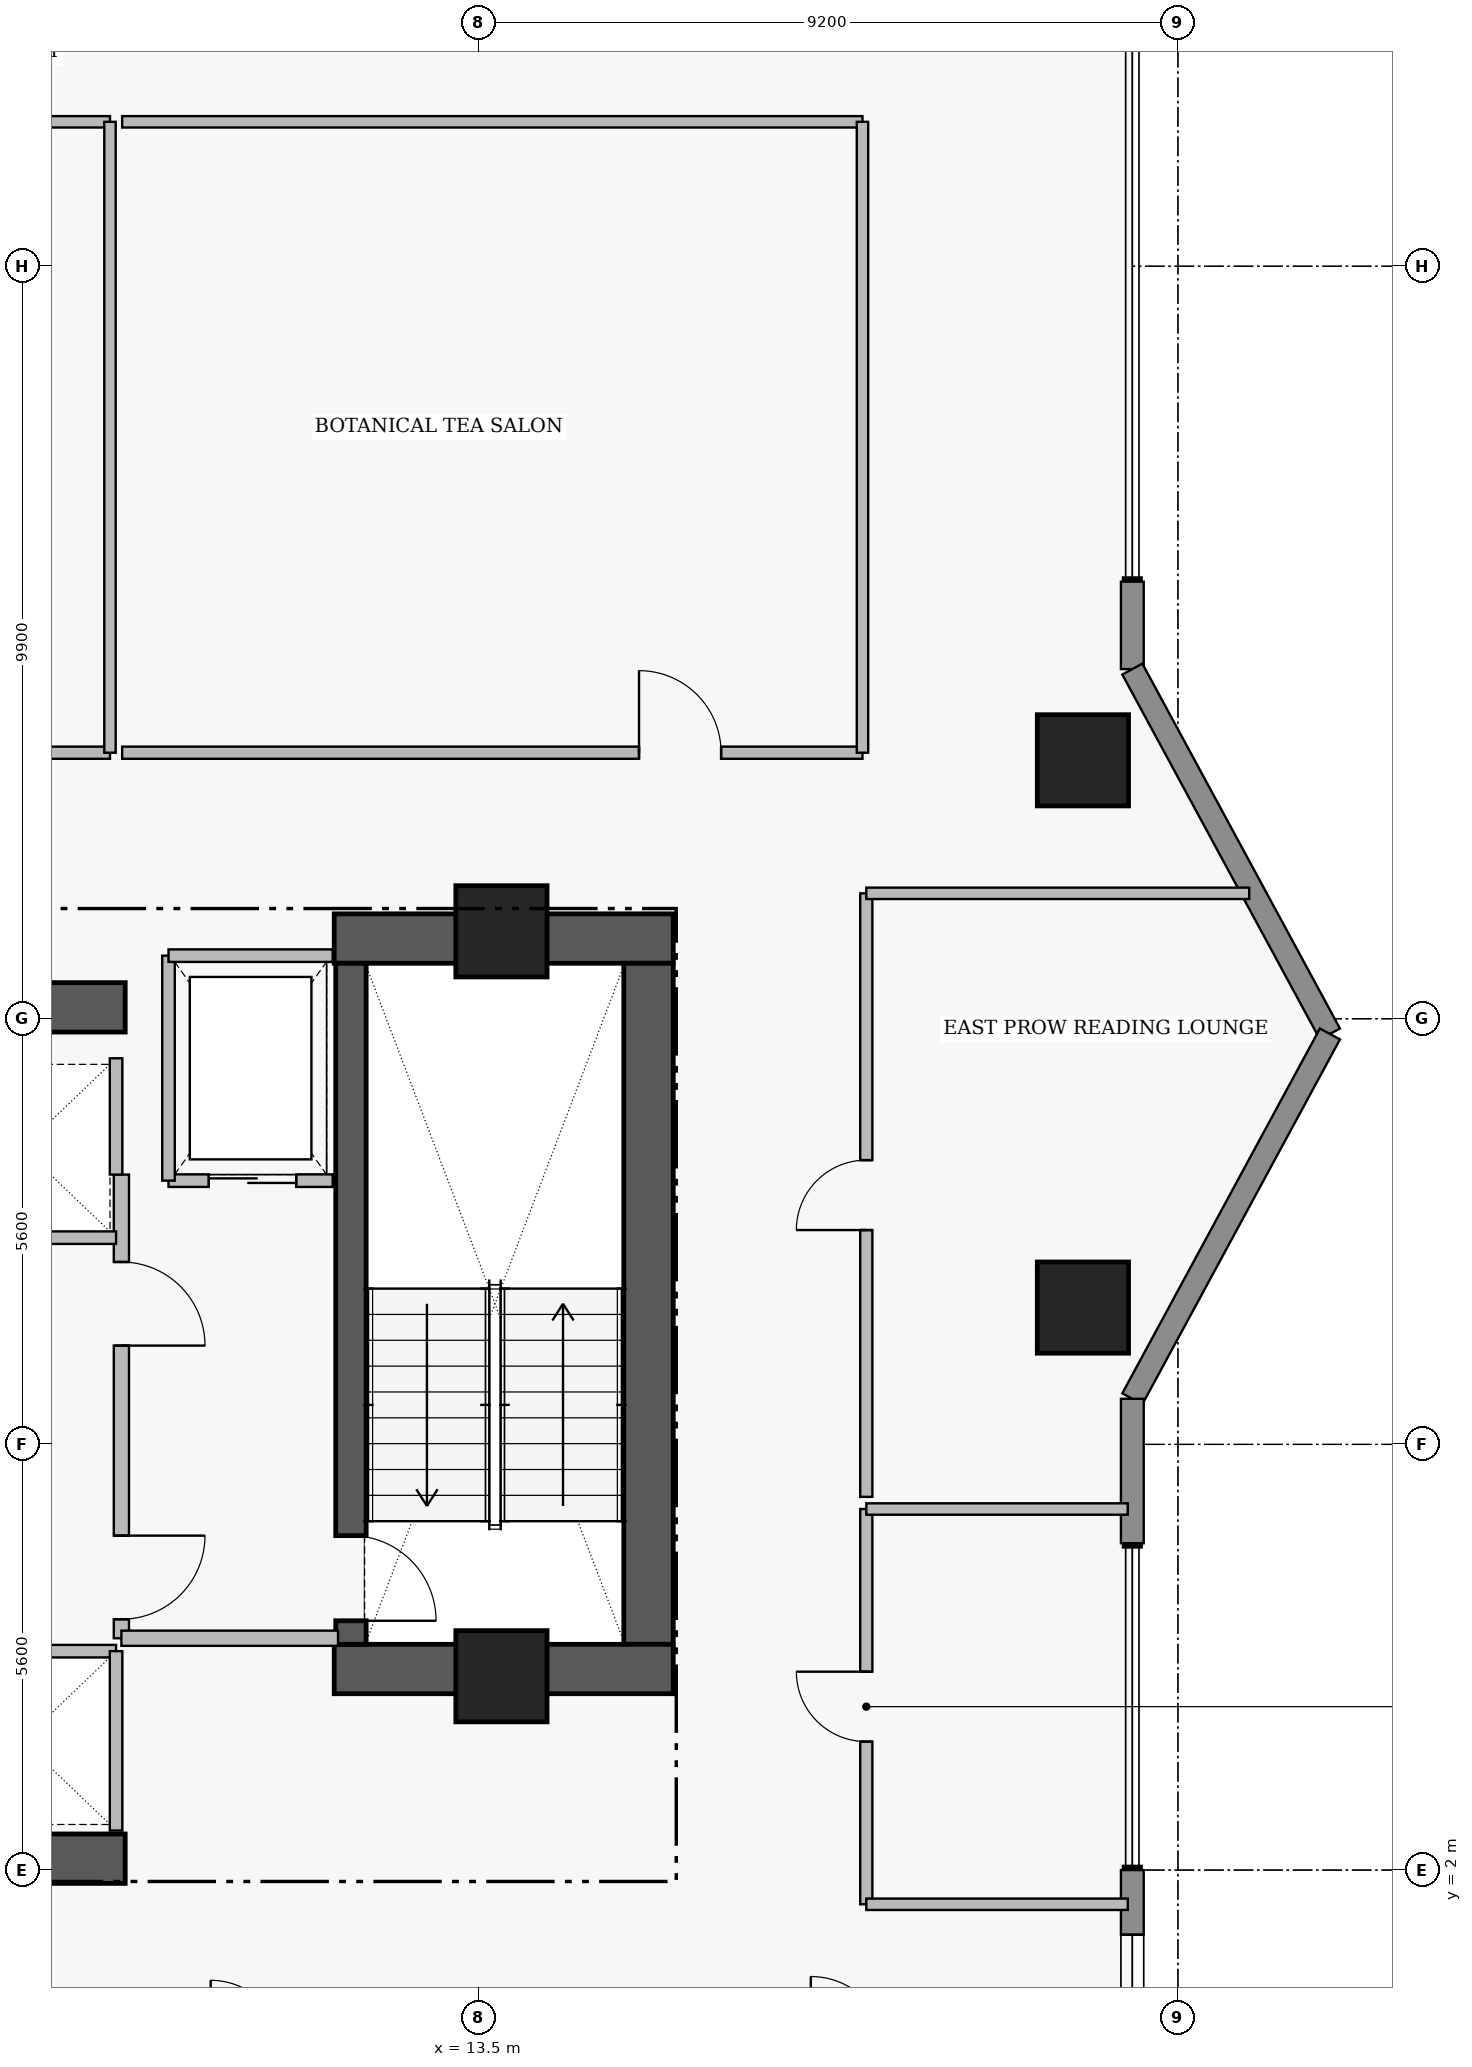
"""IFC4 building model, lengths in metres.
Left out: names, types, materials, properties, quantities, classifications, styles, units other than length and angle.
Written with IfcOpenShell. Run it as: python <this file> out.ifc"""

import sys

from ifc_helpers import new_model, si_unit, direction, frame, frame_2d, origin, origin_2d, place, context, subcontext, project, spatial, rectangle, extrude, element, fill, save


model = new_model("IFC4")
c1 = context("Model", 3, precision=1e-05, world=origin(), true_north=direction((0.0, 1.0)))
c2 = subcontext(c1, "Body", "Model", "MODEL_VIEW")
j1 = project(units=[si_unit("LENGTHUNIT", "METRE"), si_unit("PLANEANGLEUNIT", "RADIAN")], contexts=[c1])
p1 = place(None, origin())
s1 = spatial("IfcSite", under=j1, at=p1, CompositionType="ELEMENT")
p2 = place(p1, origin())
s2 = spatial("IfcBuilding", under=s1, at=p2, CompositionType="ELEMENT")
p3 = place(p2, frame((0.0, 0.0, 188.65)))
s3 = spatial("IfcBuildingStorey", under=s2, at=p3, CompositionType="ELEMENT", Elevation=188.65)
p4 = place(p3, frame((11.6, 14.255, 0.0), z_axis=(0.0, 0.0, 1.0), x_axis=(1.0, 0.0, 0.0)))
e1 = element("IfcWall", 1, at=p4, inside=s3, PredefinedType="SHEAR", context=c2, shape_type="SweptSolid", body=[
    extrude(rectangle(XDim=4.46, YDim=0.65, at=frame_2d((2.23, 0.0))), origin(), (0.0, 0.0, 1.0), 3.56),
])
p5 = place(p3, frame((15.735, 4.97, 0.0), z_axis=(0.0, 0.0, 1.0), x_axis=(0.0, 1.0, 0.0)))
e2 = element("IfcWall", 2, at=p5, inside=s3, PredefinedType="SHEAR", context=c2, shape_type="SweptSolid", body=[
    extrude(rectangle(XDim=8.96, YDim=0.65, at=frame_2d((4.48, 0.0))), origin(), (0.0, 0.0, 1.0), 3.56),
])
p6 = place(p3, frame((11.6, 4.645, 0.0), z_axis=(0.0, 0.0, 1.0), x_axis=(1.0, 0.0, 0.0)))
e3 = element("IfcWall", 3, at=p6, inside=s3, PredefinedType="SHEAR", context=c2, shape_type="SweptSolid", body=[
    extrude(rectangle(XDim=4.46, YDim=0.65, at=frame_2d((2.23, 0.0))), origin(), (0.0, 0.0, 1.0), 3.56),
])
for number, where, z_axis, x_axis in (
    (4, (1.25, 2.15, 0.0), (0.0, 0.0, 1.0), (1.0, 0.0, 0.0)),
    (5, (1.25, 13.35, 0.0), (0.0, 0.0, 1.0), (1.0, 0.0, 0.0)),
):
    element("IfcWall", number, at=place(p3, frame(where, z_axis=z_axis, x_axis=x_axis)), inside=s3, PredefinedType="SHEAR", context=c2, shape_type="SweptSolid", body=[
        extrude(rectangle(XDim=7.6, YDim=0.65, at=frame_2d((3.8, 0.0))), origin(), (0.0, 0.0, 1.0), 3.53),
    ])
p7 = place(p3, frame((11.82, 13.93, 0.0), z_axis=(0.0, 0.0, 1.0), x_axis=(0.0, -1.0, 0.0)))
e6 = element("IfcWall", 6, at=p7, inside=s3, PredefinedType="SHEAR", context=c2, shape_type="SweptSolid", body=[
    extrude(rectangle(XDim=8.96, YDim=0.4, at=frame_2d((4.48, 0.0))), origin(), (0.0, 0.0, 1.0), 3.56),
])
p8 = place(p7, frame((7.53, 0.0, 0.0)))
e7 = element("IfcOpeningElement", 7, at=p8, cuts=e6, PredefinedType="OPENING", context=c2, shape_type="SweptSolid", body=[
    extrude(rectangle(XDim=1.12, YDim=2.22, at=frame_2d((0.56, 1.11))), frame((0.0, 0.21, 0.0), z_axis=(0.0, -1.0, 0.0), x_axis=(1.0, 0.0, 0.0)), (0.0, 0.0, 1.0), 0.42),
])
for number, where, z_axis, x_axis in (
    (8, (13.8, 14.35, 0.0), (0.0, 0.0, 1.0), (1.0, 0.0, 0.0)),
    (9, (13.8, 4.55, 0.0), (0.0, 0.0, 1.0), (1.0, 0.0, 0.0)),
    (10, (21.45, 9.4, 0.0), (0.0, 0.0, 1.0), (1.0, 0.0, 0.0)),
    (11, (21.45, 16.6, 0.0), (0.0, 0.0, 1.0), (1.0, 0.0, 0.0)),
):
    element("IfcColumn", number, at=place(p3, frame(where, z_axis=z_axis, x_axis=x_axis)), inside=s3, PredefinedType="COLUMN", context=c2, shape_type="SweptSolid", body=[
        extrude(rectangle(XDim=1.2, YDim=1.2, at=origin_2d()), origin(), (0.0, 0.0, 1.0), 3.75),
    ])
p9 = place(p3, frame((22.1, 18.95, 0.0), z_axis=(0.0, 0.0, 1.0), x_axis=(0.0, -1.0, 0.0)))
e12 = element("IfcWall", 12, at=p9, inside=s3, PredefinedType="STANDARD", context=c2, shape_type="SweptSolid", body=[
    extrude(rectangle(XDim=1.15, YDim=0.3, at=frame_2d((0.575, 0.0))), origin(), (0.0, 0.0, 1.0), 3.53),
])
for number, where, z_axis, x_axis in (
    (13, (22.1, 17.8, 0.0), (0.0, 0.0, 1.0), (0.476, -0.879, 0.0)),
    (14, (24.7, 13.0, 0.0), (0.0, 0.0, 1.0), (-0.476, -0.879, 0.0)),
):
    element("IfcWall", number, at=place(p3, frame(where, z_axis=z_axis, x_axis=x_axis)), inside=s3, PredefinedType="STANDARD", context=c2, shape_type="SweptSolid", body=[
        extrude(rectangle(XDim=5.459, YDim=0.3, at=frame_2d((2.729, 0.0))), origin(), (0.0, 0.0, 1.0), 3.53),
    ])
p10 = place(p3, frame((22.1, 8.2, 0.0), z_axis=(0.0, 0.0, 1.0), x_axis=(0.0, -1.0, 0.0)))
e15 = element("IfcWall", 15, at=p10, inside=s3, PredefinedType="STANDARD", context=c2, shape_type="SweptSolid", body=[
    extrude(rectangle(XDim=1.9, YDim=0.3, at=frame_2d((0.95, 0.0))), origin(), (0.0, 0.0, 1.0), 3.53),
])
p11 = place(p3, frame((22.1, 2.0, 0.0), z_axis=(0.0, 0.0, 1.0), x_axis=(0.0, -1.0, 0.0)))
e16 = element("IfcWall", 16, at=p11, inside=s3, PredefinedType="STANDARD", context=c2, shape_type="SweptSolid", body=[
    extrude(rectangle(XDim=2.85, YDim=0.3, at=frame_2d((1.425, 0.0))), origin(), (0.0, 0.0, 1.0), 3.53),
])
p12 = place(p11, frame((0.85, 0.0, 0.95)))
e17 = element("IfcOpeningElement", 17, at=p12, cuts=e16, PredefinedType="OPENING", context=c2, shape_type="SweptSolid", body=[
    extrude(rectangle(XDim=1.15, YDim=1.55, at=frame_2d((0.575, 0.775))), frame((0.0, 0.16, 0.0), z_axis=(0.0, -1.0, 0.0), x_axis=(1.0, 0.0, 0.0)), (0.0, 0.0, 1.0), 0.32),
])
p13 = place(p3, frame((8.8, 11.15, 0.0), z_axis=(0.0, 0.0, 1.0), x_axis=(0.0, -1.0, 0.0)))
e18 = element("IfcWall", 18, at=p13, inside=s3, PredefinedType="PARTITIONING", context=c2, shape_type="SweptSolid", body=[
    extrude(rectangle(XDim=6.1, YDim=0.2, at=frame_2d((3.05, 0.0))), origin(), (0.0, 0.0, 1.0), 3.53),
])
p14 = place(p13, frame((1.15, 0.0, 0.0)))
e19 = element("IfcOpeningElement", 19, at=p14, cuts=e18, PredefinedType="OPENING", context=c2, shape_type="SweptSolid", body=[
    extrude(rectangle(XDim=1.1, YDim=2.2, at=frame_2d((0.55, 1.1))), frame((0.0, 0.11, 0.0), z_axis=(0.0, -1.0, 0.0), x_axis=(1.0, 0.0, 0.0)), (0.0, 0.0, 1.0), 0.22),
])
p15 = place(p13, frame((4.75, 0.0, 0.0)))
e20 = element("IfcOpeningElement", 20, at=p15, cuts=e18, PredefinedType="OPENING", context=c2, shape_type="SweptSolid", body=[
    extrude(rectangle(XDim=1.1, YDim=2.2, at=frame_2d((0.55, 1.1))), frame((0.0, 0.11, 0.0), z_axis=(0.0, -1.0, 0.0), x_axis=(1.0, 0.0, 0.0)), (0.0, 0.0, 1.0), 0.22),
])
p16 = place(p3, frame((9.42, 11.07, 0.0), z_axis=(0.0, 0.0, 1.0), x_axis=(1.0, 0.0, 0.0)))
e21 = element("IfcWall", 21, at=p16, inside=s3, PredefinedType="PARTITIONING", context=c2, shape_type="SweptSolid", body=[
    extrude(rectangle(XDim=2.16, YDim=0.165, at=frame_2d((1.08, 0.0))), origin(), (0.0, 0.0, 1.0), 3.53),
])
p17 = place(p16, frame((0.53, 0.0, 0.0)))
e22 = element("IfcOpeningElement", 22, at=p17, cuts=e21, PredefinedType="OPENING", context=c2, shape_type="SweptSolid", body=[
    extrude(rectangle(XDim=1.15, YDim=2.25, at=frame_2d((0.575, 1.125))), frame((0.0, 0.093, 0.0), z_axis=(0.0, -1.0, 0.0), x_axis=(1.0, 0.0, 0.0)), (0.0, 0.0, 1.0), 0.185),
])
p18 = place(p3, frame((0.98, 16.7, 0.0), z_axis=(0.0, 0.0, 1.0), x_axis=(1.0, 0.0, 0.0)))
e23 = element("IfcWall", 23, at=p18, inside=s3, PredefinedType="PARTITIONING", context=c2, shape_type="SweptSolid", body=[
    extrude(rectangle(XDim=7.67, YDim=0.16, at=frame_2d((3.835, 0.0))), origin(), (0.0, 0.0, 1.0), 3.124),
])
p19 = place(p18, frame((5.43, 0.0, 0.0)))
e24 = element("IfcOpeningElement", 24, at=p19, cuts=e23, PredefinedType="OPENING", context=c2, shape_type="SweptSolid", body=[
    extrude(rectangle(XDim=1.08, YDim=2.18, at=frame_2d((0.54, 1.09))), frame((0.0, 0.09, 0.0), z_axis=(0.0, -1.0, 0.0), x_axis=(1.0, 0.0, 0.0)), (0.0, 0.0, 1.0), 0.18),
])
p20 = place(p3, frame((8.81, 16.7, 0.0), z_axis=(0.0, 0.0, 1.0), x_axis=(1.0, 0.0, 0.0)))
e25 = element("IfcWall", 25, at=p20, inside=s3, PredefinedType="PARTITIONING", context=c2, shape_type="SweptSolid", body=[
    extrude(rectangle(XDim=9.74, YDim=0.16, at=frame_2d((4.87, 0.0))), origin(), (0.0, 0.0, 1.0), 3.124),
])
p21 = place(p20, frame((6.8, 0.0, 0.0)))
e26 = element("IfcOpeningElement", 26, at=p21, cuts=e25, PredefinedType="OPENING", context=c2, shape_type="SweptSolid", body=[
    extrude(rectangle(XDim=1.08, YDim=2.18, at=frame_2d((0.54, 1.09))), frame((0.0, 0.09, 0.0), z_axis=(0.0, -1.0, 0.0), x_axis=(1.0, 0.0, 0.0)), (0.0, 0.0, 1.0), 0.18),
])
p22 = place(p3, frame((18.6, 1.55, 0.0), z_axis=(0.0, 0.0, 1.0), x_axis=(0.0, 1.0, 0.0)))
e27 = element("IfcWall", 27, at=p22, inside=s3, PredefinedType="PARTITIONING", context=c2, shape_type="SweptSolid", body=[
    extrude(rectangle(XDim=5.2, YDim=0.16, at=frame_2d((2.6, 0.0))), origin(), (0.0, 0.0, 1.0), 3.53),
])
p23 = place(p22, frame((2.14, 0.0, 0.0)))
e28 = element("IfcOpeningElement", 28, at=p23, cuts=e27, PredefinedType="OPENING", context=c2, shape_type="SweptSolid", body=[
    extrude(rectangle(XDim=0.92, YDim=2.12, at=frame_2d((0.46, 1.06))), frame((0.0, 0.09, 0.0), z_axis=(0.0, -1.0, 0.0), x_axis=(1.0, 0.0, 0.0)), (0.0, 0.0, 1.0), 0.18),
])
p24 = place(p3, frame((18.6, 6.91, 0.0), z_axis=(0.0, 0.0, 1.0), x_axis=(0.0, 1.0, 0.0)))
e29 = element("IfcWall", 29, at=p24, inside=s3, PredefinedType="PARTITIONING", context=c2, shape_type="SweptSolid", body=[
    extrude(rectangle(XDim=7.94, YDim=0.16, at=frame_2d((3.97, 0.0))), origin(), (0.0, 0.0, 1.0), 3.53),
])
p25 = place(p24, frame((3.51, 0.0, 0.0)))
e30 = element("IfcOpeningElement", 30, at=p25, cuts=e29, PredefinedType="OPENING", context=c2, shape_type="SweptSolid", body=[
    extrude(rectangle(XDim=0.92, YDim=2.12, at=frame_2d((0.46, 1.06))), frame((0.0, 0.09, 0.0), z_axis=(0.0, -1.0, 0.0), x_axis=(1.0, 0.0, 0.0)), (0.0, 0.0, 1.0), 0.18),
])
p26 = place(p3, frame((8.8, 5.05, 0.0), z_axis=(0.0, 0.0, 1.0), x_axis=(1.0, 0.0, 0.0)))
e31 = element("IfcWall", 31, at=p26, inside=s3, PredefinedType="PARTITIONING", context=c2, shape_type="SweptSolid", body=[
    extrude(rectangle(XDim=2.85, YDim=0.2, at=frame_2d((1.425, 0.0))), origin(), (0.0, 0.0, 1.0), 3.53),
])
p27 = place(p3, frame((9.42, 11.07, 0.0), z_axis=(0.0, 0.0, 1.0), x_axis=(0.0, 1.0, 0.0)))
e32 = element("IfcWall", 32, at=p27, inside=s3, PredefinedType="PARTITIONING", context=c2, shape_type="SweptSolid", body=[
    extrude(rectangle(XDim=2.96, YDim=0.165, at=frame_2d((1.48, 0.0))), origin(), (0.0, 0.0, 1.0), 3.53),
])
p28 = place(p3, frame((9.42, 14.03, 0.0), z_axis=(0.0, 0.0, 1.0), x_axis=(1.0, 0.0, 0.0)))
e33 = element("IfcWall", 33, at=p28, inside=s3, PredefinedType="PARTITIONING", context=c2, shape_type="SweptSolid", body=[
    extrude(rectangle(XDim=2.16, YDim=0.165, at=frame_2d((1.08, 0.0))), origin(), (0.0, 0.0, 1.0), 3.53),
])
p29 = place(p3, frame((6.25, 4.88, 0.0), z_axis=(0.0, 0.0, 1.0), x_axis=(1.0, 0.0, 0.0)))
e34 = element("IfcWall", 34, at=p29, inside=s3, PredefinedType="PARTITIONING", context=c2, shape_type="SweptSolid", body=[
    extrude(rectangle(XDim=2.48, YDim=0.165, at=frame_2d((1.24, 0.0))), origin(), (0.0, 0.0, 1.0), 3.53),
])
p30 = place(p3, frame((8.73, 2.52, 0.0), z_axis=(0.0, 0.0, 1.0), x_axis=(0.0, 1.0, 0.0)))
e35 = element("IfcWall", 35, at=p30, inside=s3, PredefinedType="PARTITIONING", context=c2, shape_type="SweptSolid", body=[
    extrude(rectangle(XDim=2.36, YDim=0.165, at=frame_2d((1.18, 0.0))), origin(), (0.0, 0.0, 1.0), 3.53),
])
p31 = place(p3, frame((6.25, 10.32, 0.0), z_axis=(0.0, 0.0, 1.0), x_axis=(1.0, 0.0, 0.0)))
e36 = element("IfcWall", 36, at=p31, inside=s3, PredefinedType="PARTITIONING", context=c2, shape_type="SweptSolid", body=[
    extrude(rectangle(XDim=2.48, YDim=0.165, at=frame_2d((1.24, 0.0))), origin(), (0.0, 0.0, 1.0), 3.53),
])
p32 = place(p3, frame((8.73, 11.15, 0.0), z_axis=(0.0, 0.0, 1.0), x_axis=(0.0, 1.0, 0.0)))
e37 = element("IfcWall", 37, at=p32, inside=s3, PredefinedType="PARTITIONING", context=c2, shape_type="SweptSolid", body=[
    extrude(rectangle(XDim=1.53, YDim=0.165, at=frame_2d((0.765, 0.0))), origin(), (0.0, 0.0, 1.0), 3.53),
])
p33 = place(p3, frame((0.98, 25.0, 0.0), z_axis=(0.0, 0.0, 1.0), x_axis=(1.0, 0.0, 0.0)))
e38 = element("IfcWall", 38, at=p33, inside=s3, PredefinedType="PARTITIONING", context=c2, shape_type="SweptSolid", body=[
    extrude(rectangle(XDim=7.67, YDim=0.15, at=frame_2d((3.835, 0.0))), origin(), (0.0, 0.0, 1.0), 3.124),
])
p34 = place(p3, frame((8.65, 16.7, 0.0), z_axis=(0.0, 0.0, 1.0), x_axis=(0.0, 1.0, 0.0)))
e39 = element("IfcWall", 39, at=p34, inside=s3, PredefinedType="PARTITIONING", context=c2, shape_type="SweptSolid", body=[
    extrude(rectangle(XDim=8.3, YDim=0.15, at=frame_2d((4.15, 0.0))), origin(), (0.0, 0.0, 1.0), 3.53),
])
p35 = place(p3, frame((8.81, 25.0, 0.0), z_axis=(0.0, 0.0, 1.0), x_axis=(1.0, 0.0, 0.0)))
e40 = element("IfcWall", 40, at=p35, inside=s3, PredefinedType="PARTITIONING", context=c2, shape_type="SweptSolid", body=[
    extrude(rectangle(XDim=9.74, YDim=0.15, at=frame_2d((4.87, 0.0))), origin(), (0.0, 0.0, 1.0), 3.124),
])
p36 = place(p3, frame((18.55, 16.7, 0.0), z_axis=(0.0, 0.0, 1.0), x_axis=(0.0, 1.0, 0.0)))
e41 = element("IfcWall", 41, at=p36, inside=s3, PredefinedType="PARTITIONING", context=c2, shape_type="SweptSolid", body=[
    extrude(rectangle(XDim=8.3, YDim=0.15, at=frame_2d((4.15, 0.0))), origin(), (0.0, 0.0, 1.0), 3.53),
])
for number, where, z_axis, x_axis in (
    (42, (18.6, 1.55, 0.0), (0.0, 0.0, 1.0), (1.0, 0.0, 0.0)),
    (43, (18.6, 6.75, 0.0), (0.0, 0.0, 1.0), (1.0, 0.0, 0.0)),
):
    element("IfcWall", number, at=place(p3, frame(where, z_axis=z_axis, x_axis=x_axis)), inside=s3, PredefinedType="PARTITIONING", context=c2, shape_type="SweptSolid", body=[
        extrude(rectangle(XDim=3.44, YDim=0.15, at=frame_2d((1.72, 0.0))), origin(), (0.0, 0.0, 1.0), 3.53),
    ])
p37 = place(p3, frame((18.6, 14.85, 0.0), z_axis=(0.0, 0.0, 1.0), x_axis=(1.0, 0.0, 0.0)))
e44 = element("IfcWall", 44, at=p37, inside=s3, PredefinedType="PARTITIONING", context=c2, shape_type="SweptSolid", body=[
    extrude(rectangle(XDim=5.038, YDim=0.15, at=frame_2d((2.519, 0.0))), origin(), (0.0, 0.0, 1.0), 3.53),
])
p38 = place(p12, origin())
e45 = element("IfcWindow", 45, at=p38, inside=s3, PartitioningType="SINGLE_PANEL", PredefinedType="WINDOW", context=c2, shape_type="SweptSolid", body=[
    extrude(rectangle(XDim=1.15, YDim=1.55, at=frame_2d((0.575, 0.775))), frame((0.0, 0.03, 0.0), z_axis=(0.0, -1.0, 0.0), x_axis=(1.0, 0.0, 0.0)), (0.0, 0.0, 1.0), 0.06),
])
fill(e17, e45)
p39 = place(p8, origin())
e46 = element("IfcDoor", 46, at=p39, inside=s3, OperationType="SINGLE_SWING_RIGHT", PredefinedType="DOOR", context=c2, shape_type="SweptSolid", body=[
    extrude(rectangle(XDim=1.12, YDim=2.22, at=frame_2d((0.56, 1.11))), frame((0.0, 0.025, 0.0), z_axis=(0.0, -1.0, 0.0), x_axis=(1.0, 0.0, 0.0)), (0.0, 0.0, 1.0), 0.05),
])
fill(e7, e46)
p40 = place(p14, origin())
e47 = element("IfcDoor", 47, at=p40, inside=s3, OperationType="SINGLE_SWING_RIGHT", PredefinedType="DOOR", context=c2, shape_type="SweptSolid", body=[
    extrude(rectangle(XDim=1.1, YDim=2.2, at=frame_2d((0.55, 1.1))), frame((0.0, 0.025, 0.0), z_axis=(0.0, -1.0, 0.0), x_axis=(1.0, 0.0, 0.0)), (0.0, 0.0, 1.0), 0.05),
])
fill(e19, e47)
p41 = place(p15, origin())
e48 = element("IfcDoor", 48, at=p41, inside=s3, OperationType="SINGLE_SWING_LEFT", PredefinedType="DOOR", context=c2, shape_type="SweptSolid", body=[
    extrude(rectangle(XDim=1.1, YDim=2.2, at=frame_2d((0.55, 1.1))), frame((0.0, 0.025, 0.0), z_axis=(0.0, -1.0, 0.0), x_axis=(1.0, 0.0, 0.0)), (0.0, 0.0, 1.0), 0.05),
])
fill(e20, e48)
p42 = place(p17, origin())
e49 = element("IfcDoor", 49, at=p42, inside=s3, OperationType="SLIDING_TO_LEFT", PredefinedType="DOOR", context=c2, shape_type="SweptSolid", body=[
    extrude(rectangle(XDim=1.15, YDim=2.25, at=frame_2d((0.575, 1.125))), frame((0.0, 0.025, 0.0), z_axis=(0.0, -1.0, 0.0), x_axis=(1.0, 0.0, 0.0)), (0.0, 0.0, 1.0), 0.05),
])
fill(e22, e49)
p43 = place(p21, origin())
e50 = element("IfcDoor", 50, at=p43, inside=s3, OperationType="SINGLE_SWING_LEFT", PredefinedType="DOOR", context=c2, shape_type="SweptSolid", body=[
    extrude(rectangle(XDim=1.08, YDim=2.18, at=frame_2d((0.54, 1.09))), frame((0.0, 0.025, 0.0), z_axis=(0.0, -1.0, 0.0), x_axis=(1.0, 0.0, 0.0)), (0.0, 0.0, 1.0), 0.05),
])
fill(e26, e50)
p44 = place(p23, origin())
e51 = element("IfcDoor", 51, at=p44, inside=s3, OperationType="SINGLE_SWING_RIGHT", PredefinedType="DOOR", context=c2, shape_type="SweptSolid", body=[
    extrude(rectangle(XDim=0.92, YDim=2.12, at=frame_2d((0.46, 1.06))), frame((0.0, 0.025, 0.0), z_axis=(0.0, -1.0, 0.0), x_axis=(1.0, 0.0, 0.0)), (0.0, 0.0, 1.0), 0.05),
])
fill(e28, e51)
p45 = place(p25, origin())
e52 = element("IfcDoor", 52, at=p45, inside=s3, OperationType="SINGLE_SWING_LEFT", PredefinedType="DOOR", context=c2, shape_type="SweptSolid", body=[
    extrude(rectangle(XDim=0.92, YDim=2.12, at=frame_2d((0.46, 1.06))), frame((0.0, 0.025, 0.0), z_axis=(0.0, -1.0, 0.0), x_axis=(1.0, 0.0, 0.0)), (0.0, 0.0, 1.0), 0.05),
])
fill(e30, e52)
save(model, sys.argv[1])
